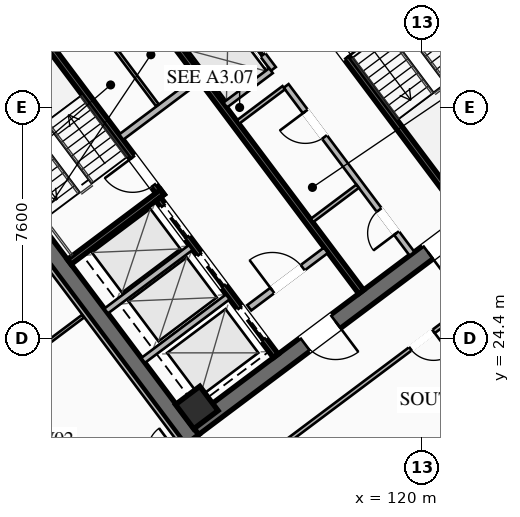
"""IFC4 building model, lengths in metres.
Left out: names, types, materials, properties, quantities, classifications, styles, units other than length and angle.
Written with IfcOpenShell. Run it as: python <this file> out.ifc"""

import sys

from ifc_helpers import new_model, si_unit, direction, frame, frame_2d, origin, origin_2d, place, context, subcontext, project, spatial, rectangle, hollow_rectangle, extrude, element, fill, save


model = new_model("IFC4")
c1 = context("Model", 3, precision=1e-05, world=origin(), true_north=direction((0.0, 1.0)))
c2 = subcontext(c1, "Body", "Model", "MODEL_VIEW")
j1 = project(units=[si_unit("LENGTHUNIT", "METRE"), si_unit("PLANEANGLEUNIT", "RADIAN")], contexts=[c1])
p1 = place(None, origin())
s1 = spatial("IfcSite", under=j1, at=p1, CompositionType="ELEMENT")
p2 = place(p1, origin())
s2 = spatial("IfcBuilding", under=s1, at=p2, CompositionType="ELEMENT")
p3 = place(p2, frame((0.0, 0.0, 139.25)))
s3 = spatial("IfcBuildingStorey", under=s2, at=p3, CompositionType="ELEMENT", Elevation=139.25)
for number, where, z_axis, x_axis in (
    (1, (112.436, 21.077, 0.0), (0.0, 0.0, 1.0), (-0.6, 0.8, 0.0)),
    (2, (115.564, 42.923, 0.0), (0.0, 0.0, 1.0), (0.6, -0.8, 0.0)),
):
    element("IfcWall", number, at=place(p3, frame(where, z_axis=z_axis, x_axis=x_axis)), inside=s3, PredefinedType="SHEAR", context=c2, shape_type="SweptSolid", body=[
        extrude(rectangle(XDim=15.6, YDim=0.55, at=frame_2d((7.8, 0.0))), origin(), (0.0, 0.0, 1.0), 3.55),
    ])
p4 = place(p3, frame((124.539, 30.498, 0.0), z_axis=(0.0, 0.0, 1.0), x_axis=(-0.799998054672, -0.600002593761, 0.0)))
e3 = element("IfcWall", 3, at=p4, inside=s3, PredefinedType="SHEAR", context=c2, shape_type="SweptSolid", body=[
    extrude(rectangle(XDim=15.06, YDim=0.55, at=frame_2d((7.53, 0.0))), origin(), (0.0, 0.0, 1.0), 3.55),
])
p5 = place(p4, frame((9.23, 0.0, 0.0)))
e4 = element("IfcOpeningElement", 4, at=p5, cuts=e3, PredefinedType="OPENING", context=c2, shape_type="SweptSolid", body=[
    extrude(rectangle(XDim=1.25, YDim=2.25, at=frame_2d((0.625, 1.125))), frame((0.0, 0.285, 0.0), z_axis=(0.0, -1.0, 0.0), x_axis=(1.0, 0.0, 0.0)), (0.0, 0.0, 1.0), 0.57),
])
p6 = place(p4, frame((4.18, 0.0, 0.0)))
e5 = element("IfcOpeningElement", 5, at=p6, cuts=e3, PredefinedType="OPENING", context=c2, shape_type="SweptSolid", body=[
    extrude(rectangle(XDim=1.25, YDim=2.25, at=frame_2d((0.625, 1.125))), frame((0.0, 0.285, 0.0), z_axis=(0.0, -1.0, 0.0), x_axis=(1.0, 0.0, 0.0)), (0.0, 0.0, 1.0), 0.57),
])
p7 = place(p3, frame((103.461, 33.502, 0.0), z_axis=(0.0, 0.0, 1.0), x_axis=(0.799998054672, 0.600002593761, 0.0)))
e6 = element("IfcWall", 6, at=p7, inside=s3, PredefinedType="SHEAR", context=c2, shape_type="SweptSolid", body=[
    extrude(rectangle(XDim=15.06, YDim=0.55, at=frame_2d((7.53, 0.0))), origin(), (0.0, 0.0, 1.0), 3.55),
])
p8 = place(p7, frame((4.58, 0.0, 0.0)))
e7 = element("IfcOpeningElement", 7, at=p8, cuts=e6, PredefinedType="OPENING", context=c2, shape_type="SweptSolid", body=[
    extrude(rectangle(XDim=1.25, YDim=2.25, at=frame_2d((0.625, 1.125))), frame((0.0, 0.285, 0.0), z_axis=(0.0, -1.0, 0.0), x_axis=(1.0, 0.0, 0.0)), (0.0, 0.0, 1.0), 0.57),
])
p9 = place(p7, frame((9.63, 0.0, 0.0)))
e8 = element("IfcOpeningElement", 8, at=p9, cuts=e6, PredefinedType="OPENING", context=c2, shape_type="SweptSolid", body=[
    extrude(rectangle(XDim=1.25, YDim=2.25, at=frame_2d((0.625, 1.125))), frame((0.0, 0.285, 0.0), z_axis=(0.0, -1.0, 0.0), x_axis=(1.0, 0.0, 0.0)), (0.0, 0.0, 1.0), 0.57),
])
p10 = place(p3, frame((112.59, 22.13, 0.0), z_axis=(0.0, 0.0, 1.0), x_axis=(0.799999996291, 0.600000004945, 0.0)))
e9 = element("IfcColumn", 9, at=p10, inside=s3, PredefinedType="COLUMN", context=c2, shape_type="SweptSolid", body=[
    extrude(hollow_rectangle(XDim=1.0, YDim=1.0, WallThickness=0.04, at=origin_2d()), origin(), (0.0, 0.0, 1.0), 3.37),
])
p11 = place(p3, frame((111.44, 29.08, 0.0), z_axis=(0.0, 0.0, 1.0), x_axis=(-0.59999029481, 0.8000072788, 0.0)))
e10 = element("IfcWall", 10, at=p11, inside=s3, PredefinedType="SHEAR", context=c2, shape_type="SweptSolid", body=[
    extrude(rectangle(XDim=8.05, YDim=0.2, at=frame_2d((4.025, 0.0))), origin(), (0.0, 0.0, 1.0), 3.37),
])
p12 = place(p11, frame((0.45, 0.0, 0.0)))
e11 = element("IfcOpeningElement", 11, at=p12, cuts=e10, PredefinedType="OPENING", context=c2, shape_type="SweptSolid", body=[
    extrude(rectangle(XDim=1.15, YDim=2.2, at=frame_2d((0.575, 1.1))), frame((0.0, 0.11, 0.0), z_axis=(0.0, -1.0, 0.0), x_axis=(1.0, 0.0, 0.0)), (0.0, 0.0, 1.0), 0.22),
])
p13 = place(p3, frame((108.396, 26.922, 0.0), z_axis=(0.0, 0.0, 1.0), x_axis=(0.800015298837, 0.599979601008, 0.0)))
e12 = element("IfcWall", 12, at=p13, inside=s3, PredefinedType="SHEAR", context=c2, shape_type="SweptSolid", body=[
    extrude(rectangle(XDim=3.83, YDim=0.2, at=frame_2d((1.915, 0.0))), origin(), (0.0, 0.0, 1.0), 3.37),
])
p14 = place(p3, frame((116.56, 34.92, 0.0), z_axis=(0.0, 0.0, 1.0), x_axis=(0.59999029481, -0.8000072788, 0.0)))
e13 = element("IfcWall", 13, at=p14, inside=s3, PredefinedType="SHEAR", context=c2, shape_type="SweptSolid", body=[
    extrude(rectangle(XDim=8.05, YDim=0.2, at=frame_2d((4.025, 0.0))), origin(), (0.0, 0.0, 1.0), 3.37),
])
p15 = place(p14, frame((0.45, 0.0, 0.0)))
e14 = element("IfcOpeningElement", 14, at=p15, cuts=e13, PredefinedType="OPENING", context=c2, shape_type="SweptSolid", body=[
    extrude(rectangle(XDim=1.15, YDim=2.2, at=frame_2d((0.575, 1.1))), frame((0.0, 0.11, 0.0), z_axis=(0.0, -1.0, 0.0), x_axis=(1.0, 0.0, 0.0)), (0.0, 0.0, 1.0), 0.22),
])
p16 = place(p3, frame((117.998, 25.936, 0.0), z_axis=(0.0, 0.0, 1.0), x_axis=(-0.600002693989, 0.799997979501, 0.0)))
e15 = element("IfcWall", 15, at=p16, inside=s3, PredefinedType="SHEAR", context=c2, shape_type="SweptSolid", body=[
    extrude(rectangle(XDim=14.5, YDim=0.2, at=frame_2d((7.25, 0.0))), origin(), (0.0, 0.0, 1.0), 3.37),
])
p17 = place(p3, frame((110.104, 31.028, 0.0), z_axis=(0.0, 0.0, 1.0), x_axis=(0.800018601094, 0.59997519774, 0.0)))
e16 = element("IfcWall", 16, at=p17, inside=s3, PredefinedType="SOLIDWALL", context=c2, shape_type="SweptSolid", body=[
    extrude(rectangle(XDim=3.15, YDim=0.22, at=frame_2d((1.575, 0.0))), origin(), (0.0, 0.0, 1.0), 2.723),
])
p18 = place(p3, frame((114.316, 25.412, 0.0), z_axis=(0.0, 0.0, 1.0), x_axis=(0.800018601094, 0.59997519774, 0.0)))
e17 = element("IfcWall", 17, at=p18, inside=s3, PredefinedType="SOLIDWALL", context=c2, shape_type="SweptSolid", body=[
    extrude(rectangle(XDim=3.15, YDim=0.22, at=frame_2d((1.575, 0.0))), origin(), (0.0, 0.0, 1.0), 2.723),
])
p19 = place(p18, frame((0.95, 0.0, 0.0)))
e18 = element("IfcOpeningElement", 18, at=p19, cuts=e17, PredefinedType="OPENING", context=c2, shape_type="SweptSolid", body=[
    extrude(rectangle(XDim=1.25, YDim=2.25, at=frame_2d((0.625, 1.125))), frame((0.0, 0.12, 0.0), z_axis=(0.0, -1.0, 0.0), x_axis=(1.0, 0.0, 0.0)), (0.0, 0.0, 1.0), 0.24),
])
p20 = place(p3, frame((115.19, 23.83, 0.0), z_axis=(0.0, 0.0, 1.0), x_axis=(-0.599993943644, 0.800004542231, 0.0)))
e19 = element("IfcWall", 19, at=p20, inside=s3, PredefinedType="SHEAR", context=c2, shape_type="SweptSolid", body=[
    extrude(rectangle(XDim=6.45, YDim=0.2, at=frame_2d((3.225, 0.0))), origin(), (0.0, 0.0, 1.0), 3.37),
])
p21 = place(p20, frame((4.875, 0.0, 0.0)))
e20 = element("IfcOpeningElement", 20, at=p21, cuts=e19, PredefinedType="OPENING", context=c2, shape_type="SweptSolid", body=[
    extrude(rectangle(XDim=1.3, YDim=2.25, at=frame_2d((0.65, 1.125))), frame((0.0, 0.11, 0.0), z_axis=(0.0, -1.0, 0.0), x_axis=(1.0, 0.0, 0.0)), (0.0, 0.0, 1.0), 0.22),
])
p22 = place(p20, frame((2.875, 0.0, 0.0)))
e21 = element("IfcOpeningElement", 21, at=p22, cuts=e19, PredefinedType="OPENING", context=c2, shape_type="SweptSolid", body=[
    extrude(rectangle(XDim=1.3, YDim=2.25, at=frame_2d((0.65, 1.125))), frame((0.0, 0.11, 0.0), z_axis=(0.0, -1.0, 0.0), x_axis=(1.0, 0.0, 0.0)), (0.0, 0.0, 1.0), 0.22),
])
p23 = place(p20, frame((0.675, 0.0, 0.0)))
e22 = element("IfcOpeningElement", 22, at=p23, cuts=e19, PredefinedType="OPENING", context=c2, shape_type="SweptSolid", body=[
    extrude(rectangle(XDim=1.3, YDim=2.25, at=frame_2d((0.65, 1.125))), frame((0.0, 0.11, 0.0), z_axis=(0.0, -1.0, 0.0), x_axis=(1.0, 0.0, 0.0)), (0.0, 0.0, 1.0), 0.22),
])
for number, where, z_axis, x_axis in (
    (23, (110.826, 23.682, 0.0), (0.0, 0.0, 1.0), (0.8, 0.6, 0.0)),
    (24, (109.608, 25.306, 0.0), (0.0, 0.0, 1.0), (0.8, 0.6, 0.0)),
):
    element("IfcWall", number, at=place(p3, frame(where, z_axis=z_axis, x_axis=x_axis)), inside=s3, PredefinedType="SOLIDWALL", context=c2, shape_type="SweptSolid", body=[
        extrude(rectangle(XDim=3.48, YDim=0.2, at=frame_2d((1.74, 0.0))), origin(), (0.0, 0.0, 1.0), 3.37),
    ])
p24 = place(p3, frame((111.296, 32.072, 0.0), z_axis=(0.0, 0.0, 1.0), x_axis=(-0.59995887973, 0.800030838552, 0.0)))
e25 = element("IfcWall", 25, at=p24, inside=s3, PredefinedType="PARTITIONING", context=c2, shape_type="SweptSolid", body=[
    extrude(rectangle(XDim=3.8, YDim=0.11, at=frame_2d((1.9, 0.0))), origin(), (0.0, 0.0, 1.0), 2.723),
])
p25 = place(p3, frame((119.67, 27.19, 0.0), z_axis=(0.0, 0.0, 1.0), x_axis=(-0.599988677396, 0.800008491828, 0.0)))
e26 = element("IfcWall", 26, at=p25, inside=s3, PredefinedType="SOLIDWALL", context=c2, shape_type="SweptSolid", body=[
    extrude(rectangle(XDim=6.9, YDim=0.2, at=frame_2d((3.45, 0.0))), origin(), (0.0, 0.0, 1.0), 2.723),
])
p26 = place(p25, frame((0.85, 0.0, 0.0)))
e27 = element("IfcOpeningElement", 27, at=p26, cuts=e26, PredefinedType="OPENING", context=c2, shape_type="SweptSolid", body=[
    extrude(rectangle(XDim=0.95, YDim=2.05, at=frame_2d((0.475, 1.025))), frame((0.0, 0.11, 0.0), z_axis=(0.0, -1.0, 0.0), x_axis=(1.0, 0.0, 0.0)), (0.0, 0.0, 1.0), 0.22),
])
p27 = place(p25, frame((4.8, 0.0, 0.0)))
e28 = element("IfcOpeningElement", 28, at=p27, cuts=e26, PredefinedType="OPENING", context=c2, shape_type="SweptSolid", body=[
    extrude(rectangle(XDim=1.05, YDim=2.2, at=frame_2d((0.525, 1.1))), frame((0.0, 0.11, 0.0), z_axis=(0.0, -1.0, 0.0), x_axis=(1.0, 0.0, 0.0)), (0.0, 0.0, 1.0), 0.22),
])
for number, where, z_axis, x_axis in (
    (29, (113.946, 31.522, 0.0), (0.0, 0.0, 1.0), (0.8, 0.6, 0.0)),
    (30, (116.376, 28.282, 0.0), (0.0, 0.0, 1.0), (0.8, 0.6, 0.0)),
):
    element("IfcWall", number, at=place(p3, frame(where, z_axis=z_axis, x_axis=x_axis)), inside=s3, PredefinedType="PARTITIONING", context=c2, shape_type="SweptSolid", body=[
        extrude(rectangle(XDim=1.88, YDim=0.135, at=frame_2d((0.94, 0.0))), origin(), (0.0, 0.0, 1.0), 2.723),
    ])
p28 = place(p3, frame((115.11, 33.27, 0.0), z_axis=(0.0, 0.0, 1.0), x_axis=(-0.600011322243, 0.799991508192, 0.0)))
e31 = element("IfcWall", 31, at=p28, inside=s3, PredefinedType="SOLIDWALL", context=c2, shape_type="SweptSolid", body=[
    extrude(rectangle(XDim=6.9, YDim=0.2, at=frame_2d((3.45, 0.0))), origin(), (0.0, 0.0, 1.0), 3.37),
])
p29 = place(p28, frame((0.575, 0.0, 0.0)))
e32 = element("IfcOpeningElement", 32, at=p29, cuts=e31, PredefinedType="OPENING", context=c2, shape_type="SweptSolid", body=[
    extrude(rectangle(XDim=1.1, YDim=2.2, at=frame_2d((0.55, 1.1))), frame((0.0, 0.11, 0.0), z_axis=(0.0, -1.0, 0.0), x_axis=(1.0, 0.0, 0.0)), (0.0, 0.0, 1.0), 0.22),
])
p30 = place(p28, frame((2.825, 0.0, 0.0)))
e33 = element("IfcOpeningElement", 33, at=p30, cuts=e31, PredefinedType="OPENING", context=c2, shape_type="SweptSolid", body=[
    extrude(rectangle(XDim=1.1, YDim=2.2, at=frame_2d((0.55, 1.1))), frame((0.0, 0.11, 0.0), z_axis=(0.0, -1.0, 0.0), x_axis=(1.0, 0.0, 0.0)), (0.0, 0.0, 1.0), 0.22),
])
p31 = place(p28, frame((5.075, 0.0, 0.0)))
e34 = element("IfcOpeningElement", 34, at=p31, cuts=e31, PredefinedType="OPENING", context=c2, shape_type="SweptSolid", body=[
    extrude(rectangle(XDim=1.1, YDim=2.2, at=frame_2d((0.55, 1.1))), frame((0.0, 0.11, 0.0), z_axis=(0.0, -1.0, 0.0), x_axis=(1.0, 0.0, 0.0)), (0.0, 0.0, 1.0), 0.22),
])
p32 = place(p3, frame((113.526, 32.082, 0.0), z_axis=(0.0, 0.0, 1.0), x_axis=(0.800046745961, 0.599937666993, 0.0)))
e35 = element("IfcWall", 35, at=p32, inside=s3, PredefinedType="SOLIDWALL", context=c2, shape_type="SweptSolid", body=[
    extrude(rectangle(XDim=1.88, YDim=0.2, at=frame_2d((0.94, 0.0))), origin(), (0.0, 0.0, 1.0), 3.37),
])
p33 = place(p3, frame((112.176, 33.882, 0.0), z_axis=(0.0, 0.0, 1.0), x_axis=(0.8, 0.6, 0.0)))
e36 = element("IfcWall", 36, at=p33, inside=s3, PredefinedType="SOLIDWALL", context=c2, shape_type="SweptSolid", body=[
    extrude(rectangle(XDim=1.88, YDim=0.2, at=frame_2d((0.94, 0.0))), origin(), (0.0, 0.0, 1.0), 3.37),
])
p34 = place(p3, frame((95.87, 30.09, 0.0), z_axis=(0.0, 0.0, 1.0), x_axis=(0.799997191971, 0.600003744021, 0.0)))
e37 = element("IfcWall", 37, at=p34, inside=s3, PredefinedType="PARTITIONING", context=c2, shape_type="SweptSolid", body=[
    extrude(rectangle(XDim=31.3, YDim=0.135, at=frame_2d((15.65, 0.0))), origin(), (0.0, 0.0, 1.0), 2.723),
])
p35 = place(p34, frame((0.3, 0.0, 0.0)))
e38 = element("IfcOpeningElement", 38, at=p35, cuts=e37, PredefinedType="OPENING", context=c2, shape_type="SweptSolid", body=[
    extrude(rectangle(XDim=0.95, YDim=2.05, at=frame_2d((0.475, 1.025))), frame((0.0, 0.077, 0.0), z_axis=(0.0, -1.0, 0.0), x_axis=(1.0, 0.0, 0.0)), (0.0, 0.0, 1.0), 0.155),
])
p36 = place(p34, frame((11.12, 0.0, 0.0)))
e39 = element("IfcOpeningElement", 39, at=p36, cuts=e37, PredefinedType="OPENING", context=c2, shape_type="SweptSolid", body=[
    extrude(rectangle(XDim=0.95, YDim=2.05, at=frame_2d((0.475, 1.025))), frame((0.0, 0.077, 0.0), z_axis=(0.0, -1.0, 0.0), x_axis=(1.0, 0.0, 0.0)), (0.0, 0.0, 1.0), 0.155),
])
p37 = place(p34, frame((15.423, 0.0, 0.0)))
e40 = element("IfcOpeningElement", 40, at=p37, cuts=e37, PredefinedType="OPENING", context=c2, shape_type="SweptSolid", body=[
    extrude(rectangle(XDim=0.95, YDim=2.05, at=frame_2d((0.475, 1.025))), frame((0.0, 0.077, 0.0), z_axis=(0.0, -1.0, 0.0), x_axis=(1.0, 0.0, 0.0)), (0.0, 0.0, 1.0), 0.155),
])
p38 = place(p34, frame((19.228, 0.0, 0.0)))
e41 = element("IfcOpeningElement", 41, at=p38, cuts=e37, PredefinedType="OPENING", context=c2, shape_type="SweptSolid", body=[
    extrude(rectangle(XDim=0.95, YDim=2.05, at=frame_2d((0.475, 1.025))), frame((0.0, 0.077, 0.0), z_axis=(0.0, -1.0, 0.0), x_axis=(1.0, 0.0, 0.0)), (0.0, 0.0, 1.0), 0.155),
])
p39 = place(p34, frame((30.05, 0.0, 0.0)))
e42 = element("IfcOpeningElement", 42, at=p39, cuts=e37, PredefinedType="OPENING", context=c2, shape_type="SweptSolid", body=[
    extrude(rectangle(XDim=0.95, YDim=2.05, at=frame_2d((0.475, 1.025))), frame((0.0, 0.077, 0.0), z_axis=(0.0, -1.0, 0.0), x_axis=(1.0, 0.0, 0.0)), (0.0, 0.0, 1.0), 0.155),
])
p40 = place(p3, frame((132.352, 33.614, 0.0), z_axis=(0.0, 0.0, 1.0), x_axis=(-0.8, -0.6, 0.0)))
e43 = element("IfcWall", 43, at=p40, inside=s3, PredefinedType="PARTITIONING", context=c2, shape_type="SweptSolid", body=[
    extrude(rectangle(XDim=31.3, YDim=0.135, at=frame_2d((15.65, 0.0))), origin(), (0.0, 0.0, 1.0), 2.723),
])
p41 = place(p40, frame((29.97, 0.0, 0.0)))
e44 = element("IfcOpeningElement", 44, at=p41, cuts=e43, PredefinedType="OPENING", context=c2, shape_type="SweptSolid", body=[
    extrude(rectangle(XDim=0.95, YDim=2.05, at=frame_2d((0.475, 1.025))), frame((0.0, 0.077, 0.0), z_axis=(0.0, -1.0, 0.0), x_axis=(1.0, 0.0, 0.0)), (0.0, 0.0, 1.0), 0.155),
])
p42 = place(p40, frame((14.968, 0.0, 0.0)))
e45 = element("IfcOpeningElement", 45, at=p42, cuts=e43, PredefinedType="OPENING", context=c2, shape_type="SweptSolid", body=[
    extrude(rectangle(XDim=0.95, YDim=2.05, at=frame_2d((0.475, 1.025))), frame((0.0, 0.077, 0.0), z_axis=(0.0, -1.0, 0.0), x_axis=(1.0, 0.0, 0.0)), (0.0, 0.0, 1.0), 0.155),
])
p43 = place(p40, frame((0.38, 0.0, 0.0)))
e46 = element("IfcOpeningElement", 46, at=p43, cuts=e43, PredefinedType="OPENING", context=c2, shape_type="SweptSolid", body=[
    extrude(rectangle(XDim=0.95, YDim=2.05, at=frame_2d((0.475, 1.025))), frame((0.0, 0.077, 0.0), z_axis=(0.0, -1.0, 0.0), x_axis=(1.0, 0.0, 0.0)), (0.0, 0.0, 1.0), 0.155),
])
p44 = place(p3, frame((112.104, 20.928, 0.0), z_axis=(0.0, 0.0, 1.0), x_axis=(-0.599994940075, 0.800003794918, 0.0)))
e47 = element("IfcWall", 47, at=p44, inside=s3, PredefinedType="PARTITIONING", context=c2, shape_type="SweptSolid", body=[
    extrude(rectangle(XDim=15.44, YDim=0.135, at=frame_2d((7.72, 0.0))), origin(), (0.0, 0.0, 1.0), 2.723),
])
p45 = place(p3, frame((100.816, 19.112, 0.0), z_axis=(0.0, 0.0, 1.0), x_axis=(0.800002918023, 0.599996109283, 0.0)))
e48 = element("IfcWall", 48, at=p45, inside=s3, PredefinedType="PARTITIONING", context=c2, shape_type="SweptSolid", body=[
    extrude(rectangle(XDim=10.04, YDim=0.11, at=frame_2d((5.02, 0.0))), origin(), (0.0, 0.0, 1.0), 2.723),
])
p46 = place(p5, origin())
e49 = element("IfcDoor", 49, at=p46, inside=s3, OperationType="SINGLE_SWING_LEFT", PredefinedType="DOOR", context=c2, shape_type="SweptSolid", body=[
    extrude(rectangle(XDim=1.25, YDim=2.25, at=frame_2d((0.625, 1.125))), frame((0.0, 0.025, 0.0), z_axis=(0.0, -1.0, 0.0), x_axis=(1.0, 0.0, 0.0)), (0.0, 0.0, 1.0), 0.05),
])
fill(e4, e49)
p47 = place(p6, origin())
e50 = element("IfcDoor", 50, at=p47, inside=s3, OperationType="SINGLE_SWING_RIGHT", PredefinedType="DOOR", context=c2, shape_type="SweptSolid", body=[
    extrude(rectangle(XDim=1.25, YDim=2.25, at=frame_2d((0.625, 1.125))), frame((0.0, 0.025, 0.0), z_axis=(0.0, -1.0, 0.0), x_axis=(1.0, 0.0, 0.0)), (0.0, 0.0, 1.0), 0.05),
])
fill(e5, e50)
p48 = place(p12, origin())
e51 = element("IfcDoor", 51, at=p48, inside=s3, OperationType="SINGLE_SWING_RIGHT", PredefinedType="DOOR", context=c2, shape_type="SweptSolid", body=[
    extrude(rectangle(XDim=1.15, YDim=2.2, at=frame_2d((0.575, 1.1))), frame((0.0, 0.025, 0.0), z_axis=(0.0, -1.0, 0.0), x_axis=(1.0, 0.0, 0.0)), (0.0, 0.0, 1.0), 0.05),
])
fill(e11, e51)
p49 = place(p15, origin())
e52 = element("IfcDoor", 52, at=p49, inside=s3, OperationType="SINGLE_SWING_RIGHT", PredefinedType="DOOR", context=c2, shape_type="SweptSolid", body=[
    extrude(rectangle(XDim=1.15, YDim=2.2, at=frame_2d((0.575, 1.1))), frame((0.0, 0.025, 0.0), z_axis=(0.0, -1.0, 0.0), x_axis=(1.0, 0.0, 0.0)), (0.0, 0.0, 1.0), 0.05),
])
fill(e14, e52)
p50 = place(p19, origin())
e53 = element("IfcDoor", 53, at=p50, inside=s3, OperationType="SINGLE_SWING_LEFT", PredefinedType="DOOR", context=c2, shape_type="SweptSolid", body=[
    extrude(rectangle(XDim=1.25, YDim=2.25, at=frame_2d((0.625, 1.125))), frame((0.0, 0.025, 0.0), z_axis=(0.0, -1.0, 0.0), x_axis=(1.0, 0.0, 0.0)), (0.0, 0.0, 1.0), 0.05),
])
fill(e18, e53)
p51 = place(p26, origin())
e54 = element("IfcDoor", 54, at=p51, inside=s3, OperationType="SINGLE_SWING_LEFT", PredefinedType="DOOR", context=c2, shape_type="SweptSolid", body=[
    extrude(rectangle(XDim=0.95, YDim=2.05, at=frame_2d((0.475, 1.025))), frame((0.0, 0.025, 0.0), z_axis=(0.0, -1.0, 0.0), x_axis=(1.0, 0.0, 0.0)), (0.0, 0.0, 1.0), 0.05),
])
fill(e27, e54)
p52 = place(p27, origin())
e55 = element("IfcDoor", 55, at=p52, inside=s3, OperationType="SINGLE_SWING_RIGHT", PredefinedType="DOOR", context=c2, shape_type="SweptSolid", body=[
    extrude(rectangle(XDim=1.05, YDim=2.2, at=frame_2d((0.525, 1.1))), frame((0.0, 0.025, 0.0), z_axis=(0.0, -1.0, 0.0), x_axis=(1.0, 0.0, 0.0)), (0.0, 0.0, 1.0), 0.05),
])
fill(e28, e55)
p53 = place(p42, origin())
e56 = element("IfcDoor", 56, at=p53, inside=s3, OperationType="SINGLE_SWING_LEFT", PredefinedType="DOOR", context=c2, shape_type="SweptSolid", body=[
    extrude(rectangle(XDim=0.95, YDim=2.05, at=frame_2d((0.475, 1.025))), frame((0.0, 0.025, 0.0), z_axis=(0.0, -1.0, 0.0), x_axis=(1.0, 0.0, 0.0)), (0.0, 0.0, 1.0), 0.05),
])
fill(e45, e56)
p54 = place(p21, origin())
e57 = element("IfcDoor", 57, at=p54, inside=s3, OperationType="SLIDING_TO_LEFT", PredefinedType="DOOR", context=c2, shape_type="SweptSolid", body=[
    extrude(rectangle(XDim=1.3, YDim=2.25, at=frame_2d((0.65, 1.125))), frame((0.0, 0.025, 0.0), z_axis=(0.0, -1.0, 0.0), x_axis=(1.0, 0.0, 0.0)), (0.0, 0.0, 1.0), 0.05),
])
fill(e20, e57)
p55 = place(p22, origin())
e58 = element("IfcDoor", 58, at=p55, inside=s3, OperationType="SLIDING_TO_LEFT", PredefinedType="DOOR", context=c2, shape_type="SweptSolid", body=[
    extrude(rectangle(XDim=1.3, YDim=2.25, at=frame_2d((0.65, 1.125))), frame((0.0, 0.025, 0.0), z_axis=(0.0, -1.0, 0.0), x_axis=(1.0, 0.0, 0.0)), (0.0, 0.0, 1.0), 0.05),
])
fill(e21, e58)
p56 = place(p23, origin())
e59 = element("IfcDoor", 59, at=p56, inside=s3, OperationType="SLIDING_TO_LEFT", PredefinedType="DOOR", context=c2, shape_type="SweptSolid", body=[
    extrude(rectangle(XDim=1.3, YDim=2.25, at=frame_2d((0.65, 1.125))), frame((0.0, 0.025, 0.0), z_axis=(0.0, -1.0, 0.0), x_axis=(1.0, 0.0, 0.0)), (0.0, 0.0, 1.0), 0.05),
])
fill(e22, e59)
p57 = place(p29, origin())
e60 = element("IfcDoor", 60, at=p57, inside=s3, OperationType="SLIDING_TO_LEFT", PredefinedType="DOOR", context=c2, shape_type="SweptSolid", body=[
    extrude(rectangle(XDim=1.1, YDim=2.2, at=frame_2d((0.55, 1.1))), frame((0.0, 0.025, 0.0), z_axis=(0.0, -1.0, 0.0), x_axis=(1.0, 0.0, 0.0)), (0.0, 0.0, 1.0), 0.05),
])
fill(e32, e60)
save(model, sys.argv[1])
